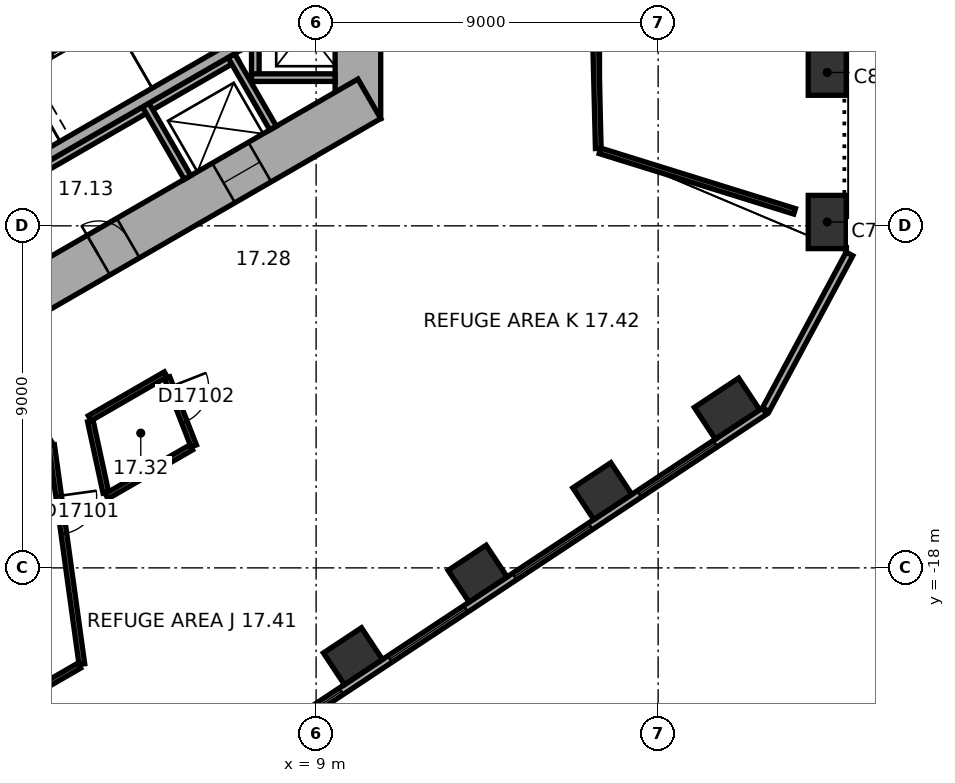
"""IFC4 building model, lengths in metres.
Left out: names, types, materials, properties, quantities, classifications, styles, units other than length and angle.
Written with IfcOpenShell. Run it as: python <this file> out.ifc"""

import sys

from ifc_helpers import new_model, si_unit, direction, frame, frame_2d, origin, origin_2d, place, context, subcontext, project, spatial, rectangle, extrude, element, fill, save


model = new_model("IFC4")
c1 = context("Model", 3, precision=1e-05, world=origin(), true_north=direction((0.0, 1.0)))
c2 = subcontext(c1, "Body", "Model", "MODEL_VIEW")
j1 = project(units=[si_unit("LENGTHUNIT", "METRE"), si_unit("PLANEANGLEUNIT", "RADIAN")], contexts=[c1])
p1 = place(None, origin())
s1 = spatial("IfcSite", under=j1, at=p1, CompositionType="ELEMENT")
p2 = place(p1, origin())
s2 = spatial("IfcBuilding", under=s1, at=p2, CompositionType="ELEMENT")
p3 = place(p2, frame((0.0, 0.0, 77.0)))
s3 = spatial("IfcBuildingStorey", under=s2, at=p3, CompositionType="ELEMENT", Elevation=77.0)
p4 = place(p3, frame((22.45, -8.899, 0.0), z_axis=(0.0, 0.0, 1.0), x_axis=(0.0, 1.0, 0.0)))
e1 = element("IfcColumn", 1, at=p4, inside=s3, PredefinedType="COLUMN", context=c2, shape_type="SweptSolid", body=[
    extrude(rectangle(XDim=1.4, YDim=1.0, at=origin_2d()), origin(), (0.0, 0.0, 1.0), 6.6),
])
for number, where, z_axis, x_axis in (
    (2, (22.45, -4.965, 0.0), (0.0, 0.0, 1.0), (0.0, 1.0, 0.0)),
    (3, (9.969, -20.324, 0.0), (0.0, 0.0, 1.0), (0.834, 0.552, 0.0)),
    (4, (13.25, -18.152, 0.0), (0.0, 0.0, 1.0), (0.834, 0.552, 0.0)),
    (5, (16.531, -15.981, 0.0), (0.0, 0.0, 1.0), (0.834, 0.552, 0.0)),
):
    element("IfcColumn", number, at=place(p3, frame(where, z_axis=z_axis, x_axis=x_axis)), inside=s3, PredefinedType="COLUMN", context=c2, shape_type="SweptSolid", body=[
        extrude(rectangle(XDim=1.2, YDim=1.0, at=origin_2d()), origin(), (0.0, 0.0, 1.0), 6.6),
    ])
p5 = place(p3, frame((19.812, -13.809, 0.0), z_axis=(0.0, 0.0, 1.0), x_axis=(0.833885822067, 0.551936985312, 0.0)))
e6 = element("IfcColumn", 6, at=p5, inside=s3, PredefinedType="COLUMN", context=c2, shape_type="SweptSolid", body=[
    extrude(rectangle(XDim=1.4, YDim=1.0, at=origin_2d()), origin(), (0.0, 0.0, 1.0), 6.6),
])
p6 = place(p3, frame((10.1, -6.177, 0.0), z_axis=(0.0, 0.0, 1.0), x_axis=(0.0, 1.0, 0.0)))
e7 = element("IfcWall", 7, at=p6, inside=s3, PredefinedType="SHEAR", context=c2, shape_type="SweptSolid", body=[
    extrude(rectangle(XDim=12.355, YDim=1.2, at=frame_2d((6.177, 0.0))), origin(), (0.0, 0.0, 1.0), 6.6),
])
p7 = place(p6, frame((6.378, 0.0, 0.0)))
e8 = element("IfcOpeningElement", 8, at=p7, cuts=e7, PredefinedType="OPENING", context=c2, shape_type="SweptSolid", body=[
    extrude(rectangle(XDim=1.5, YDim=2.1, at=frame_2d((0.75, 1.05))), frame((0.0, 0.61, 0.0), z_axis=(0.0, -1.0, 0.0), x_axis=(1.0, 0.0, 0.0)), (0.0, 0.0, 1.0), 1.22),
])
p8 = place(p6, frame((1.828, 0.0, 0.0)))
e9 = element("IfcOpeningElement", 9, at=p8, cuts=e7, PredefinedType="OPENING", context=c2, shape_type="SweptSolid", body=[
    extrude(rectangle(XDim=1.1, YDim=2.1, at=frame_2d((0.55, 1.05))), frame((0.0, 0.61, 0.0), z_axis=(0.0, -1.0, 0.0), x_axis=(1.0, 0.0, 0.0)), (0.0, 0.0, 1.0), 1.22),
])
p9 = place(p6, frame((4.427, 0.0, 0.0)))
e10 = element("IfcOpeningElement", 10, at=p9, cuts=e7, PredefinedType="OPENING", context=c2, shape_type="SweptSolid", body=[
    extrude(rectangle(XDim=1.1, YDim=2.1, at=frame_2d((0.55, 1.05))), frame((0.0, 0.61, 0.0), z_axis=(0.0, -1.0, 0.0), x_axis=(1.0, 0.0, 0.0)), (0.0, 0.0, 1.0), 1.22),
])
p10 = place(p3, frame((-0.3, -11.836, 0.0), z_axis=(0.0, 0.0, 1.0), x_axis=(0.866021384402, 0.500006961711, 0.0)))
e11 = element("IfcWall", 11, at=p10, inside=s3, PredefinedType="SHEAR", context=c2, shape_type="SweptSolid", body=[
    extrude(rectangle(XDim=12.355, YDim=1.2, at=frame_2d((6.178, 0.0))), origin(), (0.0, 0.0, 1.0), 6.6),
])
p11 = place(p10, frame((4.128, 0.0, 0.0)))
e12 = element("IfcOpeningElement", 12, at=p11, cuts=e11, PredefinedType="OPENING", context=c2, shape_type="SweptSolid", body=[
    extrude(rectangle(XDim=0.9, YDim=2.1, at=frame_2d((0.45, 1.05))), frame((0.0, 0.61, 0.0), z_axis=(0.0, -1.0, 0.0), x_axis=(1.0, 0.0, 0.0)), (0.0, 0.0, 1.0), 1.22),
])
p12 = place(p10, frame((7.928, 0.0, 0.0)))
e13 = element("IfcOpeningElement", 13, at=p12, cuts=e11, PredefinedType="OPENING", context=c2, shape_type="SweptSolid", body=[
    extrude(rectangle(XDim=1.1, YDim=2.1, at=frame_2d((0.55, 1.05))), frame((0.0, 0.61, 0.0), z_axis=(0.0, -1.0, 0.0), x_axis=(1.0, 0.0, 0.0)), (0.0, 0.0, 1.0), 1.22),
])
p13 = place(p3, frame((3.083, -25.601, 0.0), z_axis=(0.0, 0.0, 1.0), x_axis=(0.833884295743, 0.551939291329, 0.0)))
e14 = element("IfcWall", 14, at=p13, inside=s3, PredefinedType="STANDARD", context=c2, shape_type="SweptSolid", body=[
    extrude(rectangle(XDim=21.246, YDim=0.2, at=frame_2d((10.623, 0.0))), origin(), (0.0, 0.0, 1.0), 6.6),
])
p14 = place(p13, frame((1.553, 0.0, 0.8)))
e15 = element("IfcOpeningElement", 15, at=p14, cuts=e14, PredefinedType="OPENING", context=c2, shape_type="SweptSolid", body=[
    extrude(rectangle(XDim=2.4, YDim=4.2, at=frame_2d((1.2, 2.1))), frame((0.0, 0.11, 0.0), z_axis=(0.0, -1.0, 0.0), x_axis=(1.0, 0.0, 0.0)), (0.0, 0.0, 1.0), 0.22),
])
p15 = place(p13, frame((5.488, 0.0, 0.8)))
e16 = element("IfcOpeningElement", 16, at=p15, cuts=e14, PredefinedType="OPENING", context=c2, shape_type="SweptSolid", body=[
    extrude(rectangle(XDim=2.4, YDim=4.2, at=frame_2d((1.2, 2.1))), frame((0.0, 0.11, 0.0), z_axis=(0.0, -1.0, 0.0), x_axis=(1.0, 0.0, 0.0)), (0.0, 0.0, 1.0), 0.22),
])
p16 = place(p13, frame((9.422, 0.0, 0.8)))
e17 = element("IfcOpeningElement", 17, at=p16, cuts=e14, PredefinedType="OPENING", context=c2, shape_type="SweptSolid", body=[
    extrude(rectangle(XDim=2.4, YDim=4.2, at=frame_2d((1.2, 2.1))), frame((0.0, 0.11, 0.0), z_axis=(0.0, -1.0, 0.0), x_axis=(1.0, 0.0, 0.0)), (0.0, 0.0, 1.0), 0.22),
])
p17 = place(p13, frame((13.357, 0.0, 0.8)))
e18 = element("IfcOpeningElement", 18, at=p17, cuts=e14, PredefinedType="OPENING", context=c2, shape_type="SweptSolid", body=[
    extrude(rectangle(XDim=2.4, YDim=4.2, at=frame_2d((1.2, 2.1))), frame((0.0, 0.11, 0.0), z_axis=(0.0, -1.0, 0.0), x_axis=(1.0, 0.0, 0.0)), (0.0, 0.0, 1.0), 0.22),
])
p18 = place(p13, frame((17.291, 0.0, 0.8)))
e19 = element("IfcOpeningElement", 19, at=p18, cuts=e14, PredefinedType="OPENING", context=c2, shape_type="SweptSolid", body=[
    extrude(rectangle(XDim=2.4, YDim=4.2, at=frame_2d((1.2, 2.1))), frame((0.0, 0.11, 0.0), z_axis=(0.0, -1.0, 0.0), x_axis=(1.0, 0.0, 0.0)), (0.0, 0.0, 1.0), 0.22),
])
p19 = place(p3, frame((20.833, -13.839, 0.0), z_axis=(0.0, 0.0, 1.0), x_axis=(0.473301621413, 0.88090043431, 0.0)))
e20 = element("IfcWall", 20, at=p19, inside=s3, PredefinedType="STANDARD", context=c2, shape_type="SweptSolid", body=[
    extrude(rectangle(XDim=4.652, YDim=0.2, at=frame_2d((2.326, 0.0))), origin(), (0.0, 0.0, 1.0), 6.6),
])
p20 = place(p3, frame((15.991, 10.425, 0.0), z_axis=(0.0, 0.0, 1.0), x_axis=(0.024967645853, -0.999688259739, 0.0)))
e21 = element("IfcWall", 21, at=p20, inside=s3, PredefinedType="STANDARD", context=c2, shape_type="SweptSolid", body=[
    extrude(rectangle(XDim=17.396, YDim=0.15, at=frame_2d((8.698, 0.0))), origin(), (0.0, 0.0, 1.0), 2.6),
])
p21 = place(p20, frame((3.449, 0.0, 0.0)))
e22 = element("IfcOpeningElement", 22, at=p21, cuts=e21, PredefinedType="OPENING", context=c2, shape_type="SweptSolid", body=[
    extrude(rectangle(XDim=1.8, YDim=2.4, at=frame_2d((0.9, 1.2))), frame((0.0, 0.085, 0.0), z_axis=(0.0, -1.0, 0.0), x_axis=(1.0, 0.0, 0.0)), (0.0, 0.0, 1.0), 0.17),
])
p22 = place(p20, frame((12.147, 0.0, 0.0)))
e23 = element("IfcOpeningElement", 23, at=p22, cuts=e21, PredefinedType="OPENING", context=c2, shape_type="SweptSolid", body=[
    extrude(rectangle(XDim=1.8, YDim=2.4, at=frame_2d((0.9, 1.2))), frame((0.0, 0.085, 0.0), z_axis=(0.0, -1.0, 0.0), x_axis=(1.0, 0.0, 0.0)), (0.0, 0.0, 1.0), 0.17),
])
p23 = place(p3, frame((16.471, -7.027, 0.0), z_axis=(0.0, 0.0, 1.0), x_axis=(0.954937386514, -0.296807324434, 0.0)))
e24 = element("IfcWall", 24, at=p23, inside=s3, PredefinedType="STANDARD", context=c2, shape_type="SweptSolid", body=[
    extrude(rectangle(XDim=5.362, YDim=0.15, at=frame_2d((2.681, 0.0))), origin(), (0.0, 0.0, 1.0), 2.6),
])
p24 = place(p3, frame((7.4, -5.2, 0.0), z_axis=(0.0, 0.0, 1.0), x_axis=(0.0, 1.0, 0.0)))
e25 = element("IfcWall", 25, at=p24, inside=s3, PredefinedType="PARTITIONING", context=c2, shape_type="SweptSolid", body=[
    extrude(rectangle(XDim=5.4, YDim=0.2, at=frame_2d((2.7, 0.0))), origin(), (0.0, 0.0, 1.0), 6.35),
])
p25 = place(p3, frame((7.3, -5.1, 0.0), z_axis=(0.0, 0.0, 1.0), x_axis=(1.0, 0.0, 0.0)))
e26 = element("IfcWall", 26, at=p25, inside=s3, PredefinedType="PARTITIONING", context=c2, shape_type="SweptSolid", body=[
    extrude(rectangle(XDim=2.2, YDim=0.2, at=frame_2d((1.1, 0.0))), origin(), (0.0, 0.0, 1.0), 6.35),
])
p26 = place(p3, frame((-0.024, -8.559, 0.0), z_axis=(0.0, 0.0, 1.0), x_axis=(0.866026010844, 0.49999894854, 0.0)))
e27 = element("IfcWall", 27, at=p26, inside=s3, PredefinedType="PARTITIONING", context=c2, shape_type="SweptSolid", body=[
    extrude(rectangle(XDim=8.0, YDim=0.2, at=frame_2d((4.0, 0.0))), origin(), (0.0, 0.0, 1.0), 6.35),
])
for number, where, z_axis, x_axis in (
    (28, (4.516, -5.822, 0.0), (0.0, 0.0, 1.0), (0.5, -0.866, 0.0)),
    (29, (6.768, -4.522, 0.0), (0.0, 0.0, 1.0), (0.5, -0.866, 0.0)),
):
    element("IfcWall", number, at=place(p3, frame(where, z_axis=z_axis, x_axis=x_axis)), inside=s3, PredefinedType="PARTITIONING", context=c2, shape_type="SweptSolid", body=[
        extrude(rectangle(XDim=2.2, YDim=0.2, at=frame_2d((1.1, 0.0))), origin(), (0.0, 0.0, 1.0), 6.35),
    ])
p27 = place(p3, frame((0.847, -7.767, 0.0), z_axis=(0.0, 0.0, 1.0), x_axis=(0.866027801685, 0.499995846692, 0.0)))
e30 = element("IfcWall", 30, at=p27, inside=s3, PredefinedType="SHEAR", context=c2, shape_type="SweptSolid", body=[
    extrude(rectangle(XDim=7.06, YDim=0.3, at=frame_2d((3.53, 0.0))), origin(), (0.0, 0.0, 1.0), 6.35),
])
p28 = place(p3, frame((2.767, -20.573, 0.0), z_axis=(0.0, 0.0, 1.0), x_axis=(-0.866009957911, -0.500026752084, 0.0)))
e31 = element("IfcWall", 31, at=p28, inside=s3, PredefinedType="PARTITIONING", context=c2, shape_type="SweptSolid", body=[
    extrude(rectangle(XDim=3.195, YDim=0.15, at=frame_2d((1.597, 0.0))), origin(), (0.0, 0.0, 1.0), 6.35),
])
p29 = place(p3, frame((3.466, -16.018, 0.0), z_axis=(0.0, 0.0, 1.0), x_axis=(-0.211638005679, 0.977348123522, 0.0)))
e32 = element("IfcWall", 32, at=p29, inside=s3, PredefinedType="PARTITIONING", context=c2, shape_type="SweptSolid", body=[
    extrude(rectangle(XDim=1.921, YDim=0.15, at=frame_2d((0.96, 0.0))), origin(), (0.0, 0.0, 1.0), 6.35),
])
p30 = place(p3, frame((0.831, -15.34, 0.0), z_axis=(0.0, 0.0, 1.0), x_axis=(0.865866779111, 0.500274645401, 0.0)))
e33 = element("IfcWall", 33, at=p30, inside=s3, PredefinedType="PARTITIONING", context=c2, shape_type="SweptSolid", body=[
    extrude(rectangle(XDim=1.378, YDim=0.15, at=frame_2d((0.689, 0.0))), origin(), (0.0, 0.0, 1.0), 6.35),
])
p31 = place(p3, frame((5.711, -14.832, 0.0), z_axis=(0.0, 0.0, 1.0), x_axis=(-0.86603988112, -0.499974923682, 0.0)))
e34 = element("IfcWall", 34, at=p31, inside=s3, PredefinedType="PARTITIONING", context=c2, shape_type="SweptSolid", body=[
    extrude(rectangle(XDim=2.567, YDim=0.15, at=frame_2d((1.284, 0.0))), origin(), (0.0, 0.0, 1.0), 6.35),
])
p32 = place(p3, frame((2.04, -14.77, 0.0), z_axis=(0.0, 0.0, 1.0), x_axis=(0.136802116784, -0.990598395337, 0.0)))
e35 = element("IfcWall", 35, at=p32, inside=s3, PredefinedType="PARTITIONING", context=c2, shape_type="SweptSolid", body=[
    extrude(rectangle(XDim=5.818, YDim=0.15, at=frame_2d((2.909, 0.0))), origin(), (0.0, 0.0, 1.0), 5.9),
])
p33 = place(p32, frame((1.35, 0.0, 0.0)))
e36 = element("IfcOpeningElement", 36, at=p33, cuts=e35, PredefinedType="OPENING", context=c2, shape_type="SweptSolid", body=[
    extrude(rectangle(XDim=1.0, YDim=2.1, at=frame_2d((0.5, 1.05))), frame((0.0, 0.085, 0.0), z_axis=(0.0, -1.0, 0.0), x_axis=(1.0, 0.0, 0.0)), (0.0, 0.0, 1.0), 0.17),
])
p34 = place(p3, frame((3.043, -14.062, 0.0), z_axis=(0.0, 0.0, 1.0), x_axis=(0.866016621662, 0.500015210774, 0.0)))
e37 = element("IfcWall", 37, at=p34, inside=s3, PredefinedType="PARTITIONING", context=c2, shape_type="SweptSolid", body=[
    extrude(rectangle(XDim=2.31, YDim=0.15, at=frame_2d((1.155, 0.0))), origin(), (0.0, 0.0, 1.0), 6.35),
])
p35 = place(p3, frame((5.08, -13.001, 0.0), z_axis=(0.0, 0.0, 1.0), x_axis=(0.364069068896, -0.931371952054, 0.0)))
e38 = element("IfcWall", 38, at=p35, inside=s3, PredefinedType="PARTITIONING", context=c2, shape_type="SweptSolid", body=[
    extrude(rectangle(XDim=1.923, YDim=0.15, at=frame_2d((0.962, 0.0))), origin(), (0.0, 0.0, 1.0), 6.35),
])
p36 = place(p35, frame((0.25, 0.0, 0.0)))
e39 = element("IfcOpeningElement", 39, at=p36, cuts=e38, PredefinedType="OPENING", context=c2, shape_type="SweptSolid", body=[
    extrude(rectangle(XDim=1.0, YDim=2.1, at=frame_2d((0.5, 1.05))), frame((0.0, 0.085, 0.0), z_axis=(0.0, -1.0, 0.0), x_axis=(1.0, 0.0, 0.0)), (0.0, 0.0, 1.0), 0.17),
])
p37 = place(p15, origin())
e40 = element("IfcWindow", 40, at=p37, inside=s3, PartitioningType="SINGLE_PANEL", PredefinedType="WINDOW", context=c2, shape_type="SweptSolid", body=[
    extrude(rectangle(XDim=2.4, YDim=4.2, at=frame_2d((1.2, 2.1))), frame((0.0, 0.03, 0.0), z_axis=(0.0, -1.0, 0.0), x_axis=(1.0, 0.0, 0.0)), (0.0, 0.0, 1.0), 0.06),
])
fill(e16, e40)
p38 = place(p16, origin())
e41 = element("IfcWindow", 41, at=p38, inside=s3, PartitioningType="SINGLE_PANEL", PredefinedType="WINDOW", context=c2, shape_type="SweptSolid", body=[
    extrude(rectangle(XDim=2.4, YDim=4.2, at=frame_2d((1.2, 2.1))), frame((0.0, 0.03, 0.0), z_axis=(0.0, -1.0, 0.0), x_axis=(1.0, 0.0, 0.0)), (0.0, 0.0, 1.0), 0.06),
])
fill(e17, e41)
p39 = place(p17, origin())
e42 = element("IfcWindow", 42, at=p39, inside=s3, PartitioningType="SINGLE_PANEL", PredefinedType="WINDOW", context=c2, shape_type="SweptSolid", body=[
    extrude(rectangle(XDim=2.4, YDim=4.2, at=frame_2d((1.2, 2.1))), frame((0.0, 0.03, 0.0), z_axis=(0.0, -1.0, 0.0), x_axis=(1.0, 0.0, 0.0)), (0.0, 0.0, 1.0), 0.06),
])
fill(e18, e42)
p40 = place(p18, origin())
e43 = element("IfcWindow", 43, at=p40, inside=s3, PartitioningType="SINGLE_PANEL", PredefinedType="WINDOW", context=c2, shape_type="SweptSolid", body=[
    extrude(rectangle(XDim=2.4, YDim=4.2, at=frame_2d((1.2, 2.1))), frame((0.0, 0.03, 0.0), z_axis=(0.0, -1.0, 0.0), x_axis=(1.0, 0.0, 0.0)), (0.0, 0.0, 1.0), 0.06),
])
fill(e19, e43)
p41 = place(p11, origin())
e44 = element("IfcDoor", 44, at=p41, inside=s3, OperationType="SINGLE_SWING_LEFT", PredefinedType="DOOR", context=c2, shape_type="SweptSolid", body=[
    extrude(rectangle(XDim=0.9, YDim=2.1, at=frame_2d((0.45, 1.05))), frame((0.0, 0.025, 0.0), z_axis=(0.0, -1.0, 0.0), x_axis=(1.0, 0.0, 0.0)), (0.0, 0.0, 1.0), 0.05),
])
fill(e12, e44)
p42 = place(p12, origin())
e45 = element("IfcDoor", 45, at=p42, inside=s3, OperationType="DOUBLE_DOOR_SLIDING", PredefinedType="DOOR", context=c2, shape_type="SweptSolid", body=[
    extrude(rectangle(XDim=1.1, YDim=2.1, at=frame_2d((0.55, 1.05))), frame((0.0, 0.025, 0.0), z_axis=(0.0, -1.0, 0.0), x_axis=(1.0, 0.0, 0.0)), (0.0, 0.0, 1.0), 0.05),
])
fill(e13, e45)
p43 = place(p33, origin())
e46 = element("IfcDoor", 46, at=p43, inside=s3, OperationType="SINGLE_SWING_LEFT", PredefinedType="DOOR", context=c2, shape_type="SweptSolid", body=[
    extrude(rectangle(XDim=1.0, YDim=2.1, at=frame_2d((0.5, 1.05))), frame((0.0, 0.025, 0.0), z_axis=(0.0, -1.0, 0.0), x_axis=(1.0, 0.0, 0.0)), (0.0, 0.0, 1.0), 0.05),
])
fill(e36, e46)
p44 = place(p36, origin())
e47 = element("IfcDoor", 47, at=p44, inside=s3, OperationType="SINGLE_SWING_LEFT", PredefinedType="DOOR", context=c2, shape_type="SweptSolid", body=[
    extrude(rectangle(XDim=1.0, YDim=2.1, at=frame_2d((0.5, 1.05))), frame((0.0, 0.025, 0.0), z_axis=(0.0, -1.0, 0.0), x_axis=(1.0, 0.0, 0.0)), (0.0, 0.0, 1.0), 0.05),
])
fill(e39, e47)
save(model, sys.argv[1])
